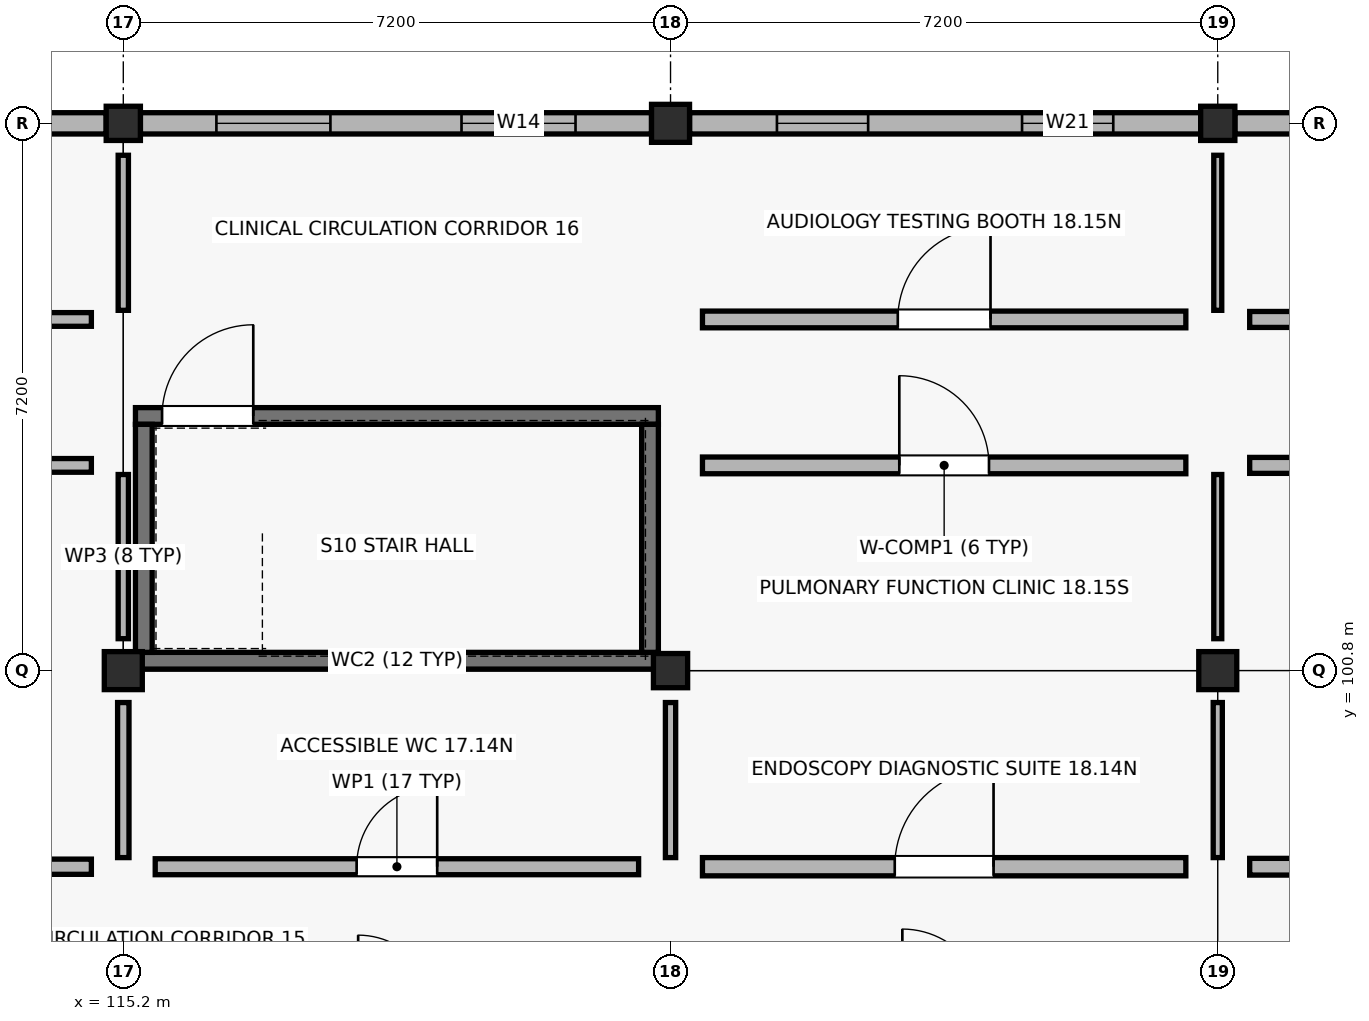
"""IFC4 building model, lengths in metres.
Left out: names, types, materials, properties, quantities, classifications, styles, units other than length and angle.
Written with IfcOpenShell. Run it as: python <this file> out.ifc"""

import sys

from ifc_helpers import new_model, si_unit, direction, frame, frame_2d, origin, origin_2d, place, context, subcontext, project, spatial, rectangle, extrude, element, fill, save


model = new_model("IFC4")
c1 = context("Model", 3, precision=1e-05, world=origin(), true_north=direction((0.0, 1.0)))
c2 = subcontext(c1, "Body", "Model", "MODEL_VIEW")
j1 = project(units=[si_unit("LENGTHUNIT", "METRE"), si_unit("PLANEANGLEUNIT", "RADIAN")], contexts=[c1])
p1 = place(None, origin())
s1 = spatial("IfcSite", under=j1, at=p1, CompositionType="ELEMENT")
p2 = place(p1, origin())
s2 = spatial("IfcBuilding", under=s1, at=p2, CompositionType="ELEMENT")
p3 = place(p2, frame((0.0, 0.0, 4.5)))
s3 = spatial("IfcBuildingStorey", under=s2, at=p3, CompositionType="ELEMENT", Elevation=4.5)
p4 = place(p3, frame((115.2, 100.8, 0.0), z_axis=(0.0, 0.0, 1.0), x_axis=(1.0, 0.0, 0.0)))
e1 = element("IfcColumn", 1, at=p4, inside=s3, PredefinedType="COLUMN", context=c2, shape_type="SweptSolid", body=[
    extrude(rectangle(XDim=0.5, YDim=0.5, at=origin_2d()), origin(), (0.0, 0.0, 1.0), 4.28),
])
for number, where, z_axis, x_axis in (
    (2, (115.2, 108.0, 0.0), (0.0, 0.0, 1.0), (1.0, 0.0, 0.0)),
    (3, (122.4, 100.8, 0.0), (0.0, 0.0, 1.0), (1.0, 0.0, 0.0)),
):
    element("IfcColumn", number, at=place(p3, frame(where, z_axis=z_axis, x_axis=x_axis)), inside=s3, PredefinedType="COLUMN", context=c2, shape_type="SweptSolid", body=[
        extrude(rectangle(XDim=0.45, YDim=0.45, at=origin_2d()), origin(), (0.0, 0.0, 1.0), 4.28),
    ])
for number, where, z_axis, x_axis in (
    (4, (122.4, 108.0, 0.0), (0.0, 0.0, 1.0), (1.0, 0.0, 0.0)),
    (5, (129.6, 100.8, 0.0), (0.0, 0.0, 1.0), (1.0, 0.0, 0.0)),
):
    element("IfcColumn", number, at=place(p3, frame(where, z_axis=z_axis, x_axis=x_axis)), inside=s3, PredefinedType="COLUMN", context=c2, shape_type="SweptSolid", body=[
        extrude(rectangle(XDim=0.5, YDim=0.5, at=origin_2d()), origin(), (0.0, 0.0, 1.0), 4.28),
    ])
p5 = place(p3, frame((129.6, 108.0, 0.0), z_axis=(0.0, 0.0, 1.0), x_axis=(1.0, 0.0, 0.0)))
e6 = element("IfcColumn", 6, at=p5, inside=s3, PredefinedType="COLUMN", context=c2, shape_type="SweptSolid", body=[
    extrude(rectangle(XDim=0.45, YDim=0.45, at=origin_2d()), origin(), (0.0, 0.0, 1.0), 4.28),
])
p6 = place(p3, frame((114.975, 108.0, 0.0), z_axis=(0.0, 0.0, 1.0), x_axis=(-1.0, 0.0, 0.0)))
e7 = element("IfcWall", 7, at=p6, inside=s3, PredefinedType="STANDARD", context=c2, shape_type="SweptSolid", body=[
    extrude(rectangle(XDim=6.725, YDim=0.28, at=frame_2d((3.363, 0.0))), origin(), (0.0, 0.0, 1.0), 3.47),
])
p7 = place(p6, frame((0.85, 0.0, 0.9)))
e8 = element("IfcOpeningElement", 8, at=p7, cuts=e7, PredefinedType="OPENING", context=c2, shape_type="SweptSolid", body=[
    extrude(rectangle(XDim=1.8, YDim=1.25, at=frame_2d((0.9, 0.625))), frame((0.0, 0.15, 0.0), z_axis=(0.0, -1.0, 0.0), x_axis=(1.0, 0.0, 0.0)), (0.0, 0.0, 1.0), 0.3),
])
p8 = place(p6, frame((4.075, 0.0, 0.9)))
e9 = element("IfcOpeningElement", 9, at=p8, cuts=e7, PredefinedType="OPENING", context=c2, shape_type="SweptSolid", body=[
    extrude(rectangle(XDim=1.8, YDim=1.25, at=frame_2d((0.9, 0.625))), frame((0.0, 0.15, 0.0), z_axis=(0.0, -1.0, 0.0), x_axis=(1.0, 0.0, 0.0)), (0.0, 0.0, 1.0), 0.3),
])
p9 = place(p3, frame((122.15, 108.0, 0.0), z_axis=(0.0, 0.0, 1.0), x_axis=(-1.0, 0.0, 0.0)))
e10 = element("IfcWall", 10, at=p9, inside=s3, PredefinedType="STANDARD", context=c2, shape_type="SweptSolid", body=[
    extrude(rectangle(XDim=6.725, YDim=0.28, at=frame_2d((3.362, 0.0))), origin(), (0.0, 0.0, 1.0), 3.47),
])
p10 = place(p9, frame((1.0, 0.0, 0.9)))
e11 = element("IfcOpeningElement", 11, at=p10, cuts=e10, PredefinedType="OPENING", context=c2, shape_type="SweptSolid", body=[
    extrude(rectangle(XDim=1.5, YDim=1.38, at=frame_2d((0.75, 0.69))), frame((0.0, 0.15, 0.0), z_axis=(0.0, -1.0, 0.0), x_axis=(1.0, 0.0, 0.0)), (0.0, 0.0, 1.0), 0.3),
])
p11 = place(p9, frame((4.225, 0.0, 0.9)))
e12 = element("IfcOpeningElement", 12, at=p11, cuts=e10, PredefinedType="OPENING", context=c2, shape_type="SweptSolid", body=[
    extrude(rectangle(XDim=1.5, YDim=1.38, at=frame_2d((0.75, 0.69))), frame((0.0, 0.15, 0.0), z_axis=(0.0, -1.0, 0.0), x_axis=(1.0, 0.0, 0.0)), (0.0, 0.0, 1.0), 0.3),
])
p12 = place(p3, frame((129.375, 108.0, 0.0), z_axis=(0.0, 0.0, 1.0), x_axis=(-1.0, 0.0, 0.0)))
e13 = element("IfcWall", 13, at=p12, inside=s3, PredefinedType="STANDARD", context=c2, shape_type="SweptSolid", body=[
    extrude(rectangle(XDim=6.725, YDim=0.28, at=frame_2d((3.363, 0.0))), origin(), (0.0, 0.0, 1.0), 3.47),
])
p13 = place(p12, frame((1.15, 0.0, 0.9)))
e14 = element("IfcOpeningElement", 14, at=p13, cuts=e13, PredefinedType="OPENING", context=c2, shape_type="SweptSolid", body=[
    extrude(rectangle(XDim=1.2, YDim=1.5, at=frame_2d((0.6, 0.75))), frame((0.0, 0.15, 0.0), z_axis=(0.0, -1.0, 0.0), x_axis=(1.0, 0.0, 0.0)), (0.0, 0.0, 1.0), 0.3),
])
p14 = place(p12, frame((4.375, 0.0, 0.9)))
e15 = element("IfcOpeningElement", 15, at=p14, cuts=e13, PredefinedType="OPENING", context=c2, shape_type="SweptSolid", body=[
    extrude(rectangle(XDim=1.2, YDim=1.5, at=frame_2d((0.6, 0.75))), frame((0.0, 0.15, 0.0), z_axis=(0.0, -1.0, 0.0), x_axis=(1.0, 0.0, 0.0)), (0.0, 0.0, 1.0), 0.3),
])
p15 = place(p3, frame((136.475, 108.0, 0.0), z_axis=(0.0, 0.0, 1.0), x_axis=(-1.0, 0.0, 0.0)))
e16 = element("IfcWall", 16, at=p15, inside=s3, PredefinedType="STANDARD", context=c2, shape_type="SweptSolid", body=[
    extrude(rectangle(XDim=6.65, YDim=0.28, at=frame_2d((3.325, 0.0))), origin(), (0.0, 0.0, 1.0), 3.47),
])
p16 = place(p15, frame((1.3, 0.0, 0.9)))
e17 = element("IfcOpeningElement", 17, at=p16, cuts=e16, PredefinedType="OPENING", context=c2, shape_type="SweptSolid", body=[
    extrude(rectangle(XDim=0.9, YDim=1.62, at=frame_2d((0.45, 0.81))), frame((0.0, 0.15, 0.0), z_axis=(0.0, -1.0, 0.0), x_axis=(1.0, 0.0, 0.0)), (0.0, 0.0, 1.0), 0.3),
])
p17 = place(p15, frame((4.45, 0.0, 0.9)))
e18 = element("IfcOpeningElement", 18, at=p17, cuts=e16, PredefinedType="OPENING", context=c2, shape_type="SweptSolid", body=[
    extrude(rectangle(XDim=0.9, YDim=1.62, at=frame_2d((0.45, 0.81))), frame((0.0, 0.15, 0.0), z_axis=(0.0, -1.0, 0.0), x_axis=(1.0, 0.0, 0.0)), (0.0, 0.0, 1.0), 0.3),
])
p18 = place(p3, frame((115.36, 100.93, 0.0), z_axis=(0.0, 0.0, 1.0), x_axis=(1.0, 0.0, 0.0)))
e19 = element("IfcWall", 19, at=p18, inside=s3, PredefinedType="SHEAR", context=c2, shape_type="SweptSolid", body=[
    extrude(rectangle(XDim=6.88, YDim=0.22, at=frame_2d((3.44, 0.0))), origin(), (0.0, 0.0, 1.0), 4.22),
])
p19 = place(p3, frame((115.36, 104.15, 0.0), z_axis=(0.0, 0.0, 1.0), x_axis=(1.0, 0.0, 0.0)))
e20 = element("IfcWall", 20, at=p19, inside=s3, PredefinedType="SHEAR", context=c2, shape_type="SweptSolid", body=[
    extrude(rectangle(XDim=6.88, YDim=0.22, at=frame_2d((3.44, 0.0))), origin(), (0.0, 0.0, 1.0), 4.22),
])
p20 = place(p19, frame((0.35, 0.0, 0.0)))
e21 = element("IfcOpeningElement", 21, at=p20, cuts=e20, PredefinedType="OPENING", context=c2, shape_type="SweptSolid", body=[
    extrude(rectangle(XDim=1.2, YDim=2.15, at=frame_2d((0.6, 1.075))), frame((0.0, 0.12, 0.0), z_axis=(0.0, -1.0, 0.0), x_axis=(1.0, 0.0, 0.0)), (0.0, 0.0, 1.0), 0.24),
])
for number, where, z_axis, x_axis in (
    (22, (115.47, 101.04, 0.0), (0.0, 0.0, 1.0), (0.0, 1.0, 0.0)),
    (23, (122.13, 101.04, 0.0), (0.0, 0.0, 1.0), (0.0, 1.0, 0.0)),
):
    element("IfcWall", number, at=place(p3, frame(where, z_axis=z_axis, x_axis=x_axis)), inside=s3, PredefinedType="SHEAR", context=c2, shape_type="SweptSolid", body=[
        extrude(rectangle(XDim=3.0, YDim=0.22, at=frame_2d((1.5, 0.0))), origin(), (0.0, 0.0, 1.0), 4.22),
    ])
p21 = place(p3, frame((108.42, 98.22, 0.0), z_axis=(0.0, 0.0, 1.0), x_axis=(1.0, 0.0, 0.0)))
e24 = element("IfcWall", 24, at=p21, inside=s3, PredefinedType="SOLIDWALL", context=c2, shape_type="SweptSolid", body=[
    extrude(rectangle(XDim=6.36, YDim=0.2, at=frame_2d((3.18, 0.0))), origin(), (0.0, 0.0, 1.0), 3.36),
])
p22 = place(p21, frame((2.73, 0.0, 0.0)))
e25 = element("IfcOpeningElement", 25, at=p22, cuts=e24, PredefinedType="OPENING", context=c2, shape_type="SweptSolid", body=[
    extrude(rectangle(XDim=0.9, YDim=2.09, at=frame_2d((0.45, 1.045))), frame((0.0, 0.11, 0.0), z_axis=(0.0, -1.0, 0.0), x_axis=(1.0, 0.0, 0.0)), (0.0, 0.0, 1.0), 0.22),
])
p23 = place(p3, frame((115.2, 98.34, 0.0), z_axis=(0.0, 0.0, 1.0), x_axis=(0.0, 1.0, 0.0)))
e26 = element("IfcWall", 26, at=p23, inside=s3, PredefinedType="PARTITIONING", context=c2, shape_type="SweptSolid", body=[
    extrude(rectangle(XDim=2.04, YDim=0.15, at=frame_2d((1.02, 0.0))), origin(), (0.0, 0.0, 1.0), 3.36),
])
p24 = place(p3, frame((108.42, 103.5, 0.0), z_axis=(0.0, 0.0, 1.0), x_axis=(1.0, 0.0, 0.0)))
e27 = element("IfcWall", 27, at=p24, inside=s3, PredefinedType="PARTITIONING", context=c2, shape_type="SweptSolid", body=[
    extrude(rectangle(XDim=6.36, YDim=0.18, at=frame_2d((3.18, 0.0))), origin(), (0.0, 0.0, 1.0), 3.36),
])
p25 = place(p24, frame((2.71, 0.0, 0.0)))
e28 = element("IfcOpeningElement", 28, at=p25, cuts=e27, PredefinedType="OPENING", context=c2, shape_type="SweptSolid", body=[
    extrude(rectangle(XDim=0.94, YDim=2.09, at=frame_2d((0.47, 1.045))), frame((0.0, 0.1, 0.0), z_axis=(0.0, -1.0, 0.0), x_axis=(1.0, 0.0, 0.0)), (0.0, 0.0, 1.0), 0.2),
])
p26 = place(p3, frame((115.2, 101.22, 0.0), z_axis=(0.0, 0.0, 1.0), x_axis=(0.0, 1.0, 0.0)))
e29 = element("IfcWall", 29, at=p26, inside=s3, PredefinedType="PARTITIONING", context=c2, shape_type="SweptSolid", body=[
    extrude(rectangle(XDim=2.16, YDim=0.135, at=frame_2d((1.08, 0.0))), origin(), (0.0, 0.0, 1.0), 3.36),
])
p27 = place(p3, frame((108.42, 105.42, 0.0), z_axis=(0.0, 0.0, 1.0), x_axis=(1.0, 0.0, 0.0)))
e30 = element("IfcWall", 30, at=p27, inside=s3, PredefinedType="PARTITIONING", context=c2, shape_type="SweptSolid", body=[
    extrude(rectangle(XDim=6.36, YDim=0.18, at=frame_2d((3.18, 0.0))), origin(), (0.0, 0.0, 1.0), 3.36),
])
p28 = place(p27, frame((2.69, 0.0, 0.0)))
e31 = element("IfcOpeningElement", 31, at=p28, cuts=e30, PredefinedType="OPENING", context=c2, shape_type="SweptSolid", body=[
    extrude(rectangle(XDim=0.98, YDim=2.09, at=frame_2d((0.49, 1.045))), frame((0.0, 0.1, 0.0), z_axis=(0.0, -1.0, 0.0), x_axis=(1.0, 0.0, 0.0)), (0.0, 0.0, 1.0), 0.2),
])
p29 = place(p3, frame((115.2, 105.54, 0.0), z_axis=(0.0, 0.0, 1.0), x_axis=(0.0, 1.0, 0.0)))
e32 = element("IfcWall", 32, at=p29, inside=s3, PredefinedType="PARTITIONING", context=c2, shape_type="SweptSolid", body=[
    extrude(rectangle(XDim=2.04, YDim=0.135, at=frame_2d((1.02, 0.0))), origin(), (0.0, 0.0, 1.0), 3.36),
])
p30 = place(p3, frame((115.62, 98.22, 0.0), z_axis=(0.0, 0.0, 1.0), x_axis=(1.0, 0.0, 0.0)))
e33 = element("IfcWall", 33, at=p30, inside=s3, PredefinedType="PLUMBINGWALL", context=c2, shape_type="SweptSolid", body=[
    extrude(rectangle(XDim=6.36, YDim=0.21, at=frame_2d((3.18, 0.0))), origin(), (0.0, 0.0, 1.0), 3.36),
])
p31 = place(p30, frame((2.65, 0.0, 0.0)))
e34 = element("IfcOpeningElement", 34, at=p31, cuts=e33, PredefinedType="OPENING", context=c2, shape_type="SweptSolid", body=[
    extrude(rectangle(XDim=1.06, YDim=2.09, at=frame_2d((0.53, 1.045))), frame((0.0, 0.115, 0.0), z_axis=(0.0, -1.0, 0.0), x_axis=(1.0, 0.0, 0.0)), (0.0, 0.0, 1.0), 0.23),
])
p32 = place(p3, frame((122.4, 98.34, 0.0), z_axis=(0.0, 0.0, 1.0), x_axis=(0.0, 1.0, 0.0)))
e35 = element("IfcWall", 35, at=p32, inside=s3, PredefinedType="PARTITIONING", context=c2, shape_type="SweptSolid", body=[
    extrude(rectangle(XDim=2.04, YDim=0.135, at=frame_2d((1.02, 0.0))), origin(), (0.0, 0.0, 1.0), 3.36),
])
p33 = place(p3, frame((122.82, 98.22, 0.0), z_axis=(0.0, 0.0, 1.0), x_axis=(1.0, 0.0, 0.0)))
e36 = element("IfcWall", 36, at=p33, inside=s3, PredefinedType="SOLIDWALL", context=c2, shape_type="SweptSolid", body=[
    extrude(rectangle(XDim=6.36, YDim=0.24, at=frame_2d((3.18, 0.0))), origin(), (0.0, 0.0, 1.0), 3.36),
])
p34 = place(p33, frame((2.53, 0.0, 0.0)))
e37 = element("IfcOpeningElement", 37, at=p34, cuts=e36, PredefinedType="OPENING", context=c2, shape_type="SweptSolid", body=[
    extrude(rectangle(XDim=1.3, YDim=2.15, at=frame_2d((0.65, 1.075))), frame((0.0, 0.13, 0.0), z_axis=(0.0, -1.0, 0.0), x_axis=(1.0, 0.0, 0.0)), (0.0, 0.0, 1.0), 0.26),
])
p35 = place(p3, frame((129.6, 98.34, 0.0), z_axis=(0.0, 0.0, 1.0), x_axis=(0.0, 1.0, 0.0)))
e38 = element("IfcWall", 38, at=p35, inside=s3, PredefinedType="PARTITIONING", context=c2, shape_type="SweptSolid", body=[
    extrude(rectangle(XDim=2.04, YDim=0.12, at=frame_2d((1.02, 0.0))), origin(), (0.0, 0.0, 1.0), 3.36),
])
p36 = place(p3, frame((122.82, 103.5, 0.0), z_axis=(0.0, 0.0, 1.0), x_axis=(1.0, 0.0, 0.0)))
e39 = element("IfcWall", 39, at=p36, inside=s3, PredefinedType="SOLIDWALL", context=c2, shape_type="SweptSolid", body=[
    extrude(rectangle(XDim=6.36, YDim=0.22, at=frame_2d((3.18, 0.0))), origin(), (0.0, 0.0, 1.0), 3.36),
])
p37 = place(p36, frame((2.59, 0.0, 0.0)))
e40 = element("IfcOpeningElement", 40, at=p37, cuts=e39, PredefinedType="OPENING", context=c2, shape_type="SweptSolid", body=[
    extrude(rectangle(XDim=1.18, YDim=2.09, at=frame_2d((0.59, 1.045))), frame((0.0, 0.12, 0.0), z_axis=(0.0, -1.0, 0.0), x_axis=(1.0, 0.0, 0.0)), (0.0, 0.0, 1.0), 0.24),
])
p38 = place(p3, frame((129.6, 101.22, 0.0), z_axis=(0.0, 0.0, 1.0), x_axis=(0.0, 1.0, 0.0)))
e41 = element("IfcWall", 41, at=p38, inside=s3, PredefinedType="PARTITIONING", context=c2, shape_type="SweptSolid", body=[
    extrude(rectangle(XDim=2.16, YDim=0.105, at=frame_2d((1.08, 0.0))), origin(), (0.0, 0.0, 1.0), 3.36),
])
p39 = place(p3, frame((122.82, 105.42, 0.0), z_axis=(0.0, 0.0, 1.0), x_axis=(1.0, 0.0, 0.0)))
e42 = element("IfcWall", 42, at=p39, inside=s3, PredefinedType="SOLIDWALL", context=c2, shape_type="SweptSolid", body=[
    extrude(rectangle(XDim=6.36, YDim=0.22, at=frame_2d((3.18, 0.0))), origin(), (0.0, 0.0, 1.0), 3.36),
])
p40 = place(p39, frame((2.57, 0.0, 0.0)))
e43 = element("IfcOpeningElement", 43, at=p40, cuts=e42, PredefinedType="OPENING", context=c2, shape_type="SweptSolid", body=[
    extrude(rectangle(XDim=1.22, YDim=2.09, at=frame_2d((0.61, 1.045))), frame((0.0, 0.12, 0.0), z_axis=(0.0, -1.0, 0.0), x_axis=(1.0, 0.0, 0.0)), (0.0, 0.0, 1.0), 0.24),
])
p41 = place(p3, frame((129.6, 105.54, 0.0), z_axis=(0.0, 0.0, 1.0), x_axis=(0.0, 1.0, 0.0)))
e44 = element("IfcWall", 44, at=p41, inside=s3, PredefinedType="PARTITIONING", context=c2, shape_type="SweptSolid", body=[
    extrude(rectangle(XDim=2.04, YDim=0.105, at=frame_2d((1.02, 0.0))), origin(), (0.0, 0.0, 1.0), 3.36),
])
p42 = place(p3, frame((130.02, 98.22, 0.0), z_axis=(0.0, 0.0, 1.0), x_axis=(1.0, 0.0, 0.0)))
e45 = element("IfcWall", 45, at=p42, inside=s3, PredefinedType="SOLIDWALL", context=c2, shape_type="SweptSolid", body=[
    extrude(rectangle(XDim=6.36, YDim=0.22, at=frame_2d((3.18, 0.0))), origin(), (0.0, 0.0, 1.0), 3.36),
])
p43 = place(p42, frame((2.53, 0.0, 0.0)))
e46 = element("IfcOpeningElement", 46, at=p43, cuts=e45, PredefinedType="OPENING", context=c2, shape_type="SweptSolid", body=[
    extrude(rectangle(XDim=1.3, YDim=2.09, at=frame_2d((0.65, 1.045))), frame((0.0, 0.12, 0.0), z_axis=(0.0, -1.0, 0.0), x_axis=(1.0, 0.0, 0.0)), (0.0, 0.0, 1.0), 0.24),
])
p44 = place(p3, frame((130.02, 103.5, 0.0), z_axis=(0.0, 0.0, 1.0), x_axis=(1.0, 0.0, 0.0)))
e47 = element("IfcWall", 47, at=p44, inside=s3, PredefinedType="PLUMBINGWALL", context=c2, shape_type="SweptSolid", body=[
    extrude(rectangle(XDim=6.36, YDim=0.21, at=frame_2d((3.18, 0.0))), origin(), (0.0, 0.0, 1.0), 3.36),
])
p45 = place(p44, frame((2.51, 0.0, 0.0)))
e48 = element("IfcOpeningElement", 48, at=p45, cuts=e47, PredefinedType="OPENING", context=c2, shape_type="SweptSolid", body=[
    extrude(rectangle(XDim=1.34, YDim=2.09, at=frame_2d((0.67, 1.045))), frame((0.0, 0.115, 0.0), z_axis=(0.0, -1.0, 0.0), x_axis=(1.0, 0.0, 0.0)), (0.0, 0.0, 1.0), 0.23),
])
p46 = place(p3, frame((130.02, 105.42, 0.0), z_axis=(0.0, 0.0, 1.0), x_axis=(1.0, 0.0, 0.0)))
e49 = element("IfcWall", 49, at=p46, inside=s3, PredefinedType="PLUMBINGWALL", context=c2, shape_type="SweptSolid", body=[
    extrude(rectangle(XDim=6.36, YDim=0.21, at=frame_2d((3.18, 0.0))), origin(), (0.0, 0.0, 1.0), 3.36),
])
p47 = place(p46, frame((2.49, 0.0, 0.0)))
e50 = element("IfcOpeningElement", 50, at=p47, cuts=e49, PredefinedType="OPENING", context=c2, shape_type="SweptSolid", body=[
    extrude(rectangle(XDim=1.38, YDim=2.09, at=frame_2d((0.69, 1.045))), frame((0.0, 0.115, 0.0), z_axis=(0.0, -1.0, 0.0), x_axis=(1.0, 0.0, 0.0)), (0.0, 0.0, 1.0), 0.23),
])
p48 = place(p10, origin())
e51 = element("IfcWindow", 51, at=p48, inside=s3, PartitioningType="SINGLE_PANEL", PredefinedType="WINDOW", context=c2, shape_type="SweptSolid", body=[
    extrude(rectangle(XDim=1.5, YDim=1.38, at=frame_2d((0.75, 0.69))), frame((0.0, 0.03, 0.0), z_axis=(0.0, -1.0, 0.0), x_axis=(1.0, 0.0, 0.0)), (0.0, 0.0, 1.0), 0.06),
])
fill(e11, e51)
p49 = place(p11, origin())
e52 = element("IfcWindow", 52, at=p49, inside=s3, PartitioningType="SINGLE_PANEL", PredefinedType="WINDOW", context=c2, shape_type="SweptSolid", body=[
    extrude(rectangle(XDim=1.5, YDim=1.38, at=frame_2d((0.75, 0.69))), frame((0.0, 0.03, 0.0), z_axis=(0.0, -1.0, 0.0), x_axis=(1.0, 0.0, 0.0)), (0.0, 0.0, 1.0), 0.06),
])
fill(e12, e52)
p50 = place(p13, origin())
e53 = element("IfcWindow", 53, at=p50, inside=s3, PartitioningType="SINGLE_PANEL", PredefinedType="WINDOW", context=c2, shape_type="SweptSolid", body=[
    extrude(rectangle(XDim=1.2, YDim=1.5, at=frame_2d((0.6, 0.75))), frame((0.0, 0.03, 0.0), z_axis=(0.0, -1.0, 0.0), x_axis=(1.0, 0.0, 0.0)), (0.0, 0.0, 1.0), 0.06),
])
fill(e14, e53)
p51 = place(p14, origin())
e54 = element("IfcWindow", 54, at=p51, inside=s3, PartitioningType="SINGLE_PANEL", PredefinedType="WINDOW", context=c2, shape_type="SweptSolid", body=[
    extrude(rectangle(XDim=1.2, YDim=1.5, at=frame_2d((0.6, 0.75))), frame((0.0, 0.03, 0.0), z_axis=(0.0, -1.0, 0.0), x_axis=(1.0, 0.0, 0.0)), (0.0, 0.0, 1.0), 0.06),
])
fill(e15, e54)
p52 = place(p20, origin())
e55 = element("IfcDoor", 55, at=p52, inside=s3, OperationType="SINGLE_SWING_RIGHT", PredefinedType="DOOR", context=c2, shape_type="SweptSolid", body=[
    extrude(rectangle(XDim=1.2, YDim=2.15, at=frame_2d((0.6, 1.075))), frame((0.0, 0.025, 0.0), z_axis=(0.0, -1.0, 0.0), x_axis=(1.0, 0.0, 0.0)), (0.0, 0.0, 1.0), 0.05),
])
fill(e21, e55)
p53 = place(p31, origin())
e56 = element("IfcDoor", 56, at=p53, inside=s3, OperationType="SINGLE_SWING_RIGHT", PredefinedType="DOOR", context=c2, shape_type="SweptSolid", body=[
    extrude(rectangle(XDim=1.06, YDim=2.09, at=frame_2d((0.53, 1.045))), frame((0.0, 0.025, 0.0), z_axis=(0.0, -1.0, 0.0), x_axis=(1.0, 0.0, 0.0)), (0.0, 0.0, 1.0), 0.05),
])
fill(e34, e56)
p54 = place(p34, origin())
e57 = element("IfcDoor", 57, at=p54, inside=s3, OperationType="SINGLE_SWING_RIGHT", PredefinedType="DOOR", context=c2, shape_type="SweptSolid", body=[
    extrude(rectangle(XDim=1.3, YDim=2.15, at=frame_2d((0.65, 1.075))), frame((0.0, 0.025, 0.0), z_axis=(0.0, -1.0, 0.0), x_axis=(1.0, 0.0, 0.0)), (0.0, 0.0, 1.0), 0.05),
])
fill(e37, e57)
p55 = place(p37, origin())
e58 = element("IfcDoor", 58, at=p55, inside=s3, OperationType="SINGLE_SWING_LEFT", PredefinedType="DOOR", context=c2, shape_type="SweptSolid", body=[
    extrude(rectangle(XDim=1.18, YDim=2.09, at=frame_2d((0.59, 1.045))), frame((0.0, 0.025, 0.0), z_axis=(0.0, -1.0, 0.0), x_axis=(1.0, 0.0, 0.0)), (0.0, 0.0, 1.0), 0.05),
])
fill(e40, e58)
p56 = place(p40, origin())
e59 = element("IfcDoor", 59, at=p56, inside=s3, OperationType="SINGLE_SWING_RIGHT", PredefinedType="DOOR", context=c2, shape_type="SweptSolid", body=[
    extrude(rectangle(XDim=1.22, YDim=2.09, at=frame_2d((0.61, 1.045))), frame((0.0, 0.025, 0.0), z_axis=(0.0, -1.0, 0.0), x_axis=(1.0, 0.0, 0.0)), (0.0, 0.0, 1.0), 0.05),
])
fill(e43, e59)
save(model, sys.argv[1])
